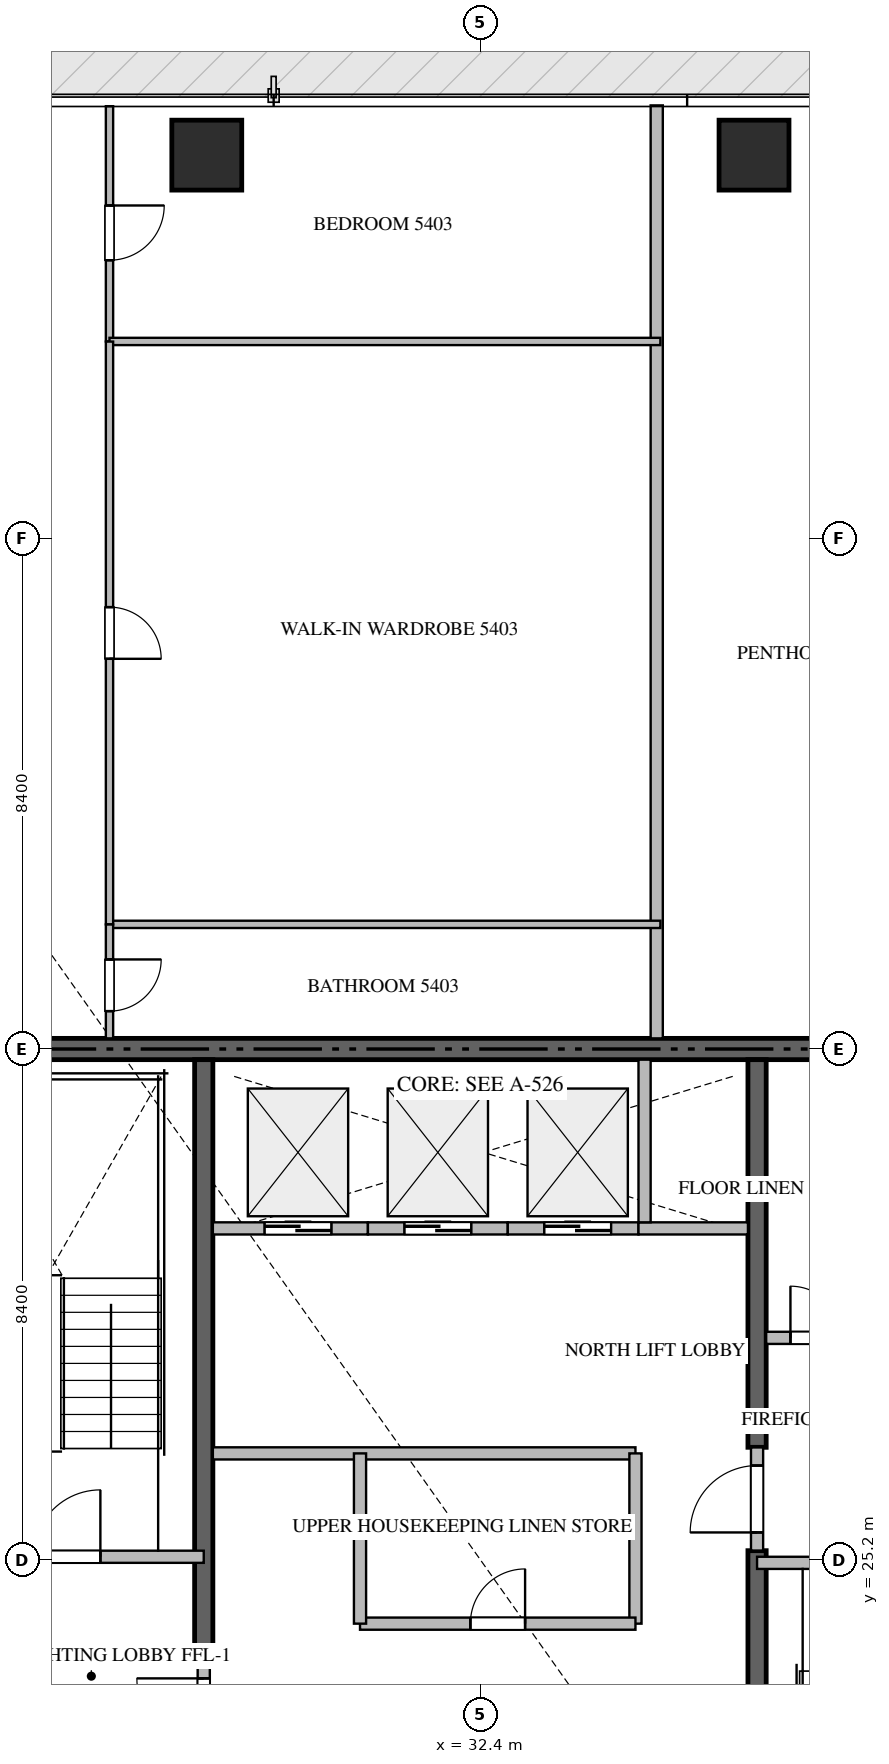
"""IFC4 building model, lengths in metres.
Left out: names, types, materials, properties, quantities, classifications, styles, units other than length and angle.
Written with IfcOpenShell. Run it as: python <this file> out.ifc"""

import sys

from ifc_helpers import new_model, si_unit, direction, frame, frame_2d, origin, origin_2d, place, context, subcontext, project, spatial, rectangle, extrude, source, transform, mapped, element, fill, save


model = new_model("IFC4")
c1 = context("Model", 3, precision=1e-05, world=origin(), true_north=direction((0.0, 1.0)))
c2 = subcontext(c1, "Body", "Model", "MODEL_VIEW")
j1 = project(units=[si_unit("LENGTHUNIT", "METRE"), si_unit("PLANEANGLEUNIT", "RADIAN")], contexts=[c1])
p1 = place(None, origin())
s1 = spatial("IfcSite", under=j1, at=p1, CompositionType="ELEMENT")
p2 = place(p1, origin())
s2 = spatial("IfcBuilding", under=s1, at=p2, CompositionType="ELEMENT")
p3 = place(p2, frame((0.0, 0.0, 218.15)))
s3 = spatial("IfcBuildingStorey", under=s2, at=p3, CompositionType="ELEMENT", Elevation=218.15)
p4 = place(p3, frame((41.4, 33.6, -0.26), z_axis=(0.0, 0.0, 1.0), x_axis=(-1.0, 0.0, 0.0)))
e1 = element("IfcWall", 1, at=p4, inside=s3, PredefinedType="SHEAR", context=c2, shape_type="SweptSolid", body=[
    extrude(rectangle(XDim=18.0, YDim=0.35, at=frame_2d((9.0, 0.0))), origin(), (0.0, 0.0, 1.0), 3.848),
])
p5 = place(p3, frame((27.85, 23.55, -0.26), z_axis=(0.0, 0.0, 1.0), x_axis=(0.0, 1.0, 0.0)))
e2 = element("IfcWall", 2, at=p5, inside=s3, PredefinedType="SHEAR", context=c2, shape_type="SweptSolid", body=[
    extrude(rectangle(XDim=9.875, YDim=0.3, at=frame_2d((4.938, 0.0))), origin(), (0.0, 0.0, 1.0), 3.848),
])
p6 = place(p3, frame((36.95, 16.975, -0.26), z_axis=(0.0, 0.0, 1.0), x_axis=(0.0, 1.0, 0.0)))
e3 = element("IfcWall", 3, at=p6, inside=s3, PredefinedType="SHEAR", context=c2, shape_type="SweptSolid", body=[
    extrude(rectangle(XDim=8.375, YDim=0.3, at=frame_2d((4.188, 0.0))), origin(), (0.0, 0.0, 1.0), 3.848),
])
p7 = place(p3, frame((36.95, 27.05, -0.26), z_axis=(0.0, 0.0, 1.0), x_axis=(0.0, 1.0, 0.0)))
e4 = element("IfcWall", 4, at=p7, inside=s3, PredefinedType="SHEAR", context=c2, shape_type="SweptSolid", body=[
    extrude(rectangle(XDim=6.375, YDim=0.3, at=frame_2d((3.188, 0.0))), origin(), (0.0, 0.0, 1.0), 3.848),
])
m1 = source(origin(), c2, "Body", "SweptSolid", [
    extrude(rectangle(XDim=1.15, YDim=1.15, at=origin_2d()), origin(), (0.0, 0.0, 1.0), 3.85),
])
for number, where, z_axis, x_axis in (
    (5, (27.9, 48.3, -0.26), (0.0, 0.0, 1.0), (1.0, 0.0, 0.0)),
    (6, (36.9, 48.3, -0.26), (0.0, 0.0, 1.0), (1.0, 0.0, 0.0)),
):
    element("IfcColumn", number, at=place(p3, frame(where, z_axis=z_axis, x_axis=x_axis)), inside=s3, PredefinedType="COLUMN", context=c2, shape_type="MappedRepresentation", body=[
        mapped(m1, transform((0.0, 0.0, 0.0), scale=1.0)),
    ])
p8 = place(p3, frame((23.4, 25.25, 0.0), z_axis=(0.0, 0.0, 1.0), x_axis=(1.0, 0.0, 0.0)))
e7 = element("IfcWall", 7, at=p8, inside=s3, PredefinedType="STANDARD", context=c2, shape_type="SweptSolid", body=[
    extrude(rectangle(XDim=4.45, YDim=0.2, at=frame_2d((2.225, 0.0))), origin(), (0.0, 0.0, 1.0), 3.59),
])
p9 = place(p8, frame((1.65, 0.0, 0.0)))
e8 = element("IfcOpeningElement", 8, at=p9, cuts=e7, PredefinedType="OPENING", context=c2, shape_type="SweptSolid", body=[
    extrude(rectangle(XDim=1.1, YDim=2.15, at=frame_2d((0.55, 1.075))), frame((0.0, 0.11, 0.0), z_axis=(0.0, -1.0, 0.0), x_axis=(1.0, 0.0, 0.0)), (0.0, 0.0, 1.0), 0.22),
])
p10 = place(p3, frame((36.95, 25.15, 0.0), z_axis=(0.0, 0.0, 1.0), x_axis=(1.0, 0.0, 0.0)))
e9 = element("IfcWall", 9, at=p10, inside=s3, PredefinedType="STANDARD", context=c2, shape_type="SweptSolid", body=[
    extrude(rectangle(XDim=4.45, YDim=0.2, at=frame_2d((2.225, 0.0))), origin(), (0.0, 0.0, 1.0), 3.59),
])
p11 = place(p10, frame((1.65, 0.0, 0.0)))
e10 = element("IfcOpeningElement", 10, at=p11, cuts=e9, PredefinedType="OPENING", context=c2, shape_type="SweptSolid", body=[
    extrude(rectangle(XDim=1.1, YDim=2.15, at=frame_2d((0.55, 1.075))), frame((0.0, 0.11, 0.0), z_axis=(0.0, -1.0, 0.0), x_axis=(1.0, 0.0, 0.0)), (0.0, 0.0, 1.0), 0.22),
])
p12 = place(p3, frame((28.0, 30.65, 0.0), z_axis=(0.0, 0.0, 1.0), x_axis=(1.0, 0.0, 0.0)))
e11 = element("IfcWall", 11, at=p12, inside=s3, PredefinedType="STANDARD", context=c2, shape_type="SweptSolid", body=[
    extrude(rectangle(XDim=2.55, YDim=0.2, at=frame_2d((1.275, 0.0))), origin(), (0.0, 0.0, 1.0), 3.59),
])
p13 = place(p12, frame((0.85, 0.0, 0.0)))
e12 = element("IfcOpeningElement", 12, at=p13, cuts=e11, PredefinedType="OPENING", context=c2, shape_type="SweptSolid", body=[
    extrude(rectangle(XDim=1.1, YDim=2.2, at=frame_2d((0.55, 1.1))), frame((0.0, 0.11, 0.0), z_axis=(0.0, -1.0, 0.0), x_axis=(1.0, 0.0, 0.0)), (0.0, 0.0, 1.0), 0.22),
])
p14 = place(p3, frame((30.55, 30.65, 0.0), z_axis=(0.0, 0.0, 1.0), x_axis=(1.0, 0.0, 0.0)))
e13 = element("IfcWall", 13, at=p14, inside=s3, PredefinedType="STANDARD", context=c2, shape_type="SweptSolid", body=[
    extrude(rectangle(XDim=2.3, YDim=0.2, at=frame_2d((1.15, 0.0))), origin(), (0.0, 0.0, 1.0), 3.59),
])
p15 = place(p14, frame((0.6, 0.0, 0.0)))
e14 = element("IfcOpeningElement", 14, at=p15, cuts=e13, PredefinedType="OPENING", context=c2, shape_type="SweptSolid", body=[
    extrude(rectangle(XDim=1.1, YDim=2.2, at=frame_2d((0.55, 1.1))), frame((0.0, 0.11, 0.0), z_axis=(0.0, -1.0, 0.0), x_axis=(1.0, 0.0, 0.0)), (0.0, 0.0, 1.0), 0.22),
])
p16 = place(p3, frame((32.85, 30.65, 0.0), z_axis=(0.0, 0.0, 1.0), x_axis=(1.0, 0.0, 0.0)))
e15 = element("IfcWall", 15, at=p16, inside=s3, PredefinedType="STANDARD", context=c2, shape_type="SweptSolid", body=[
    extrude(rectangle(XDim=2.15, YDim=0.2, at=frame_2d((1.075, 0.0))), origin(), (0.0, 0.0, 1.0), 3.59),
])
p17 = place(p16, frame((0.6, 0.0, 0.0)))
e16 = element("IfcOpeningElement", 16, at=p17, cuts=e15, PredefinedType="OPENING", context=c2, shape_type="SweptSolid", body=[
    extrude(rectangle(XDim=1.1, YDim=2.2, at=frame_2d((0.55, 1.1))), frame((0.0, 0.11, 0.0), z_axis=(0.0, -1.0, 0.0), x_axis=(1.0, 0.0, 0.0)), (0.0, 0.0, 1.0), 0.22),
])
p18 = place(p3, frame((35.0, 30.65, 0.0), z_axis=(0.0, 0.0, 1.0), x_axis=(1.0, 0.0, 0.0)))
e17 = element("IfcWall", 17, at=p18, inside=s3, PredefinedType="STANDARD", context=c2, shape_type="SweptSolid", body=[
    extrude(rectangle(XDim=1.8, YDim=0.2, at=frame_2d((0.9, 0.0))), origin(), (0.0, 0.0, 1.0), 3.59),
])
p19 = place(p3, frame((35.1, 30.75, 0.0), z_axis=(0.0, 0.0, 1.0), x_axis=(0.0, 1.0, 0.0)))
e18 = element("IfcWall", 18, at=p19, inside=s3, PredefinedType="STANDARD", context=c2, shape_type="SweptSolid", body=[
    extrude(rectangle(XDim=2.675, YDim=0.2, at=frame_2d((1.337, 0.0))), origin(), (0.0, 0.0, 1.0), 3.59),
])
p20 = place(p3, frame((37.1, 28.85, 0.0), z_axis=(0.0, 0.0, 1.0), x_axis=(1.0, 0.0, 0.0)))
e19 = element("IfcWall", 19, at=p20, inside=s3, PredefinedType="STANDARD", context=c2, shape_type="SweptSolid", body=[
    extrude(rectangle(XDim=1.648, YDim=0.2, at=frame_2d((0.824, 0.0))), origin(), (0.0, 0.0, 1.0), 3.59),
])
p21 = place(p20, frame((0.399, 0.0, 0.0)))
e20 = element("IfcOpeningElement", 20, at=p21, cuts=e19, PredefinedType="OPENING", context=c2, shape_type="SweptSolid", body=[
    extrude(rectangle(XDim=0.85, YDim=2.1, at=frame_2d((0.425, 1.05))), frame((0.0, 0.11, 0.0), z_axis=(0.0, -1.0, 0.0), x_axis=(1.0, 0.0, 0.0)), (0.0, 0.0, 1.0), 0.22),
])
p22 = place(p3, frame((27.85, 21.852, 0.0), z_axis=(0.0, 0.0, 1.0), x_axis=(0.0, 1.0, 0.0)))
e21 = element("IfcWall", 21, at=p22, inside=s3, PredefinedType="STANDARD", context=c2, shape_type="SweptSolid", body=[
    extrude(rectangle(XDim=1.696, YDim=0.2, at=frame_2d((0.848, 0.0))), origin(), (0.0, 0.0, 1.0), 3.59),
])
p23 = place(p22, frame((0.298, 0.0, 0.0)))
e22 = element("IfcOpeningElement", 22, at=p23, cuts=e21, PredefinedType="OPENING", context=c2, shape_type="SweptSolid", body=[
    extrude(rectangle(XDim=1.1, YDim=2.15, at=frame_2d((0.55, 1.075))), frame((0.0, 0.11, 0.0), z_axis=(0.0, -1.0, 0.0), x_axis=(1.0, 0.0, 0.0)), (0.0, 0.0, 1.0), 0.22),
])
p24 = place(p3, frame((36.95, 25.352, 0.0), z_axis=(0.0, 0.0, 1.0), x_axis=(0.0, 1.0, 0.0)))
e23 = element("IfcWall", 23, at=p24, inside=s3, PredefinedType="STANDARD", context=c2, shape_type="SweptSolid", body=[
    extrude(rectangle(XDim=1.696, YDim=0.2, at=frame_2d((0.848, 0.0))), origin(), (0.0, 0.0, 1.0), 3.59),
])
p25 = place(p24, frame((0.298, 0.0, 0.0)))
e24 = element("IfcOpeningElement", 24, at=p25, cuts=e23, PredefinedType="OPENING", context=c2, shape_type="SweptSolid", body=[
    extrude(rectangle(XDim=1.1, YDim=2.15, at=frame_2d((0.55, 1.075))), frame((0.0, 0.11, 0.0), z_axis=(0.0, -1.0, 0.0), x_axis=(1.0, 0.0, 0.0)), (0.0, 0.0, 1.0), 0.22),
])
p26 = place(p3, frame((28.0, 26.95, 0.0), z_axis=(0.0, 0.0, 1.0), x_axis=(1.0, 0.0, 0.0)))
e25 = element("IfcWall", 25, at=p26, inside=s3, PredefinedType="STANDARD", context=c2, shape_type="SweptSolid", body=[
    extrude(rectangle(XDim=6.95, YDim=0.2, at=frame_2d((3.475, 0.0))), origin(), (0.0, 0.0, 1.0), 3.59),
])
p27 = place(p3, frame((34.95, 24.15, 0.0), z_axis=(0.0, 0.0, 1.0), x_axis=(0.0, 1.0, 0.0)))
e26 = element("IfcWall", 26, at=p27, inside=s3, PredefinedType="STANDARD", context=c2, shape_type="SweptSolid", body=[
    extrude(rectangle(XDim=2.8, YDim=0.2, at=frame_2d((1.4, 0.0))), origin(), (0.0, 0.0, 1.0), 3.59),
])
p28 = place(p3, frame((30.42, 24.15, 0.0), z_axis=(0.0, 0.0, 1.0), x_axis=(1.0, 0.0, 0.0)))
e27 = element("IfcWall", 27, at=p28, inside=s3, PredefinedType="STANDARD", context=c2, shape_type="SweptSolid", body=[
    extrude(rectangle(XDim=4.53, YDim=0.2, at=frame_2d((2.265, 0.0))), origin(), (0.0, 0.0, 1.0), 3.59),
])
p29 = place(p28, frame((1.815, 0.0, 0.0)))
e28 = element("IfcOpeningElement", 28, at=p29, cuts=e27, PredefinedType="OPENING", context=c2, shape_type="SweptSolid", body=[
    extrude(rectangle(XDim=0.9, YDim=2.1, at=frame_2d((0.45, 1.05))), frame((0.0, 0.11, 0.0), z_axis=(0.0, -1.0, 0.0), x_axis=(1.0, 0.0, 0.0)), (0.0, 0.0, 1.0), 0.22),
])
p30 = place(p3, frame((30.42, 24.15, 0.0), z_axis=(0.0, 0.0, 1.0), x_axis=(0.0, 1.0, 0.0)))
e29 = element("IfcWall", 29, at=p30, inside=s3, PredefinedType="STANDARD", context=c2, shape_type="SweptSolid", body=[
    extrude(rectangle(XDim=2.8, YDim=0.2, at=frame_2d((1.4, 0.0))), origin(), (0.0, 0.0, 1.0), 3.59),
])
p31 = place(p3, frame((35.3, 33.775, 0.0), z_axis=(0.0, 0.0, 1.0), x_axis=(0.0, 1.0, 0.0)))
e30 = element("IfcWall", 30, at=p31, inside=s3, PredefinedType="PARTITIONING", context=c2, shape_type="SweptSolid", body=[
    extrude(rectangle(XDim=15.343, YDim=0.2, at=frame_2d((7.671, 0.0))), origin(), (0.0, 0.0, 1.0), 3.59),
])
p32 = place(p3, frame((26.3, 49.105, 0.0), z_axis=(0.0, 0.0, 1.0), x_axis=(0.0, -1.0, 0.0)))
e31 = element("IfcWall", 31, at=p32, inside=s3, PredefinedType="PARTITIONING", context=c2, shape_type="SweptSolid", body=[
    extrude(rectangle(XDim=3.869, YDim=0.12, at=frame_2d((1.935, 0.0))), origin(), (0.0, 0.0, 1.0), 3.59),
])
p33 = place(p32, frame((1.633, 0.0, 0.0)))
e32 = element("IfcOpeningElement", 32, at=p33, cuts=e31, PredefinedType="OPENING", context=c2, shape_type="SweptSolid", body=[
    extrude(rectangle(XDim=0.9, YDim=2.1, at=frame_2d((0.45, 1.05))), frame((0.0, 0.07, 0.0), z_axis=(0.0, -1.0, 0.0), x_axis=(1.0, 0.0, 0.0)), (0.0, 0.0, 1.0), 0.14),
])
for number, where, z_axis, x_axis in (
    (33, (26.3, 45.236, 0.0), (0.0, 0.0, 1.0), (1.0, 0.0, 0.0)),
    (34, (26.3, 35.65, 0.0), (0.0, 0.0, 1.0), (1.0, 0.0, 0.0)),
):
    element("IfcWall", number, at=place(p3, frame(where, z_axis=z_axis, x_axis=x_axis)), inside=s3, PredefinedType="PARTITIONING", context=c2, shape_type="SweptSolid", body=[
        extrude(rectangle(XDim=9.06, YDim=0.12, at=frame_2d((4.53, 0.0))), origin(), (0.0, 0.0, 1.0), 3.59),
    ])
p34 = place(p3, frame((26.3, 45.234, 0.0), z_axis=(0.0, 0.0, 1.0), x_axis=(0.0, -1.0, 0.0)))
e35 = element("IfcWall", 35, at=p34, inside=s3, PredefinedType="PARTITIONING", context=c2, shape_type="SweptSolid", body=[
    extrude(rectangle(XDim=9.584, YDim=0.12, at=frame_2d((4.792, 0.0))), origin(), (0.0, 0.0, 1.0), 3.59),
])
p35 = place(p34, frame((4.367, 0.0, 0.0)))
e36 = element("IfcOpeningElement", 36, at=p35, cuts=e35, PredefinedType="OPENING", context=c2, shape_type="SweptSolid", body=[
    extrude(rectangle(XDim=0.85, YDim=2.1, at=frame_2d((0.425, 1.05))), frame((0.0, 0.07, 0.0), z_axis=(0.0, -1.0, 0.0), x_axis=(1.0, 0.0, 0.0)), (0.0, 0.0, 1.0), 0.14),
])
p36 = place(p3, frame((26.3, 35.648, 0.0), z_axis=(0.0, 0.0, 1.0), x_axis=(0.0, -1.0, 0.0)))
e37 = element("IfcWall", 37, at=p36, inside=s3, PredefinedType="PARTITIONING", context=c2, shape_type="SweptSolid", body=[
    extrude(rectangle(XDim=1.873, YDim=0.12, at=frame_2d((0.937, 0.0))), origin(), (0.0, 0.0, 1.0), 3.59),
])
p37 = place(p36, frame((0.575, 0.0, 0.0)))
e38 = element("IfcOpeningElement", 38, at=p37, cuts=e37, PredefinedType="OPENING", context=c2, shape_type="SweptSolid", body=[
    extrude(rectangle(XDim=0.85, YDim=2.1, at=frame_2d((0.425, 1.05))), frame((0.0, 0.07, 0.0), z_axis=(0.0, -1.0, 0.0), x_axis=(1.0, 0.0, 0.0)), (0.0, 0.0, 1.0), 0.14),
])
m2 = source(origin(), c2, "Body", "SweptSolid", [
    extrude(rectangle(XDim=1.1, YDim=2.15, at=frame_2d((0.55, 1.075))), frame((0.0, 0.025, 0.0), z_axis=(0.0, -1.0, 0.0), x_axis=(1.0, 0.0, 0.0)), (0.0, 0.0, 1.0), 0.05),
])
p38 = place(p9, origin())
e39 = element("IfcDoor", 39, at=p38, inside=s3, OperationType="SINGLE_SWING_RIGHT", PredefinedType="DOOR", context=c2, shape_type="MappedRepresentation", body=[
    mapped(m2, transform((0.0, 0.0, 0.0), scale=1.0)),
])
fill(e8, e39)
m3 = source(origin(), c2, "Body", "SweptSolid", [
    extrude(rectangle(XDim=1.1, YDim=2.2, at=frame_2d((0.55, 1.1))), frame((0.0, 0.025, 0.0), z_axis=(0.0, -1.0, 0.0), x_axis=(1.0, 0.0, 0.0)), (0.0, 0.0, 1.0), 0.05),
])
p39 = place(p13, origin())
e40 = element("IfcDoor", 40, at=p39, inside=s3, OperationType="DOUBLE_DOOR_SLIDING", PredefinedType="DOOR", context=c2, shape_type="MappedRepresentation", body=[
    mapped(m3, transform((0.0, 0.0, 0.0), scale=1.0)),
])
fill(e12, e40)
p40 = place(p15, origin())
e41 = element("IfcDoor", 41, at=p40, inside=s3, OperationType="DOUBLE_DOOR_SLIDING", PredefinedType="DOOR", context=c2, shape_type="MappedRepresentation", body=[
    mapped(m3, transform((0.0, 0.0, 0.0), scale=1.0)),
])
fill(e14, e41)
p41 = place(p17, origin())
e42 = element("IfcDoor", 42, at=p41, inside=s3, OperationType="DOUBLE_DOOR_SLIDING", PredefinedType="DOOR", context=c2, shape_type="MappedRepresentation", body=[
    mapped(m3, transform((0.0, 0.0, 0.0), scale=1.0)),
])
fill(e16, e42)
m4 = source(origin(), c2, "Body", "SweptSolid", [
    extrude(rectangle(XDim=0.85, YDim=2.1, at=frame_2d((0.425, 1.05))), frame((0.0, 0.025, 0.0), z_axis=(0.0, -1.0, 0.0), x_axis=(1.0, 0.0, 0.0)), (0.0, 0.0, 1.0), 0.05),
])
p42 = place(p21, origin())
e43 = element("IfcDoor", 43, at=p42, inside=s3, OperationType="SINGLE_SWING_LEFT", PredefinedType="DOOR", context=c2, shape_type="MappedRepresentation", body=[
    mapped(m4, transform((0.0, 0.0, 0.0), scale=1.0)),
])
fill(e20, e43)
p43 = place(p23, origin())
e44 = element("IfcDoor", 44, at=p43, inside=s3, OperationType="SINGLE_SWING_RIGHT", PredefinedType="DOOR", context=c2, shape_type="MappedRepresentation", body=[
    mapped(m2, transform((0.0, 0.0, 0.0), scale=1.0)),
])
fill(e22, e44)
p44 = place(p25, origin())
e45 = element("IfcDoor", 45, at=p44, inside=s3, OperationType="SINGLE_SWING_LEFT", PredefinedType="DOOR", context=c2, shape_type="MappedRepresentation", body=[
    mapped(m2, transform((0.0, 0.0, 0.0), scale=1.0)),
])
fill(e24, e45)
m5 = source(origin(), c2, "Body", "SweptSolid", [
    extrude(rectangle(XDim=0.9, YDim=2.1, at=frame_2d((0.45, 1.05))), frame((0.0, 0.025, 0.0), z_axis=(0.0, -1.0, 0.0), x_axis=(1.0, 0.0, 0.0)), (0.0, 0.0, 1.0), 0.05),
])
p45 = place(p29, origin())
e46 = element("IfcDoor", 46, at=p45, inside=s3, OperationType="SINGLE_SWING_RIGHT", PredefinedType="DOOR", context=c2, shape_type="MappedRepresentation", body=[
    mapped(m5, transform((0.0, 0.0, 0.0), scale=1.0)),
])
fill(e28, e46)
p46 = place(p33, origin())
e47 = element("IfcDoor", 47, at=p46, inside=s3, OperationType="SINGLE_SWING_LEFT", PredefinedType="DOOR", context=c2, shape_type="MappedRepresentation", body=[
    mapped(m5, transform((0.0, 0.0, 0.0), scale=1.0)),
])
fill(e32, e47)
p47 = place(p35, origin())
e48 = element("IfcDoor", 48, at=p47, inside=s3, OperationType="SINGLE_SWING_RIGHT", PredefinedType="DOOR", context=c2, shape_type="MappedRepresentation", body=[
    mapped(m4, transform((0.0, 0.0, 0.0), scale=1.0)),
])
fill(e36, e48)
p48 = place(p37, origin())
e49 = element("IfcDoor", 49, at=p48, inside=s3, OperationType="SINGLE_SWING_LEFT", PredefinedType="DOOR", context=c2, shape_type="MappedRepresentation", body=[
    mapped(m4, transform((0.0, 0.0, 0.0), scale=1.0)),
])
fill(e38, e49)
save(model, sys.argv[1])
